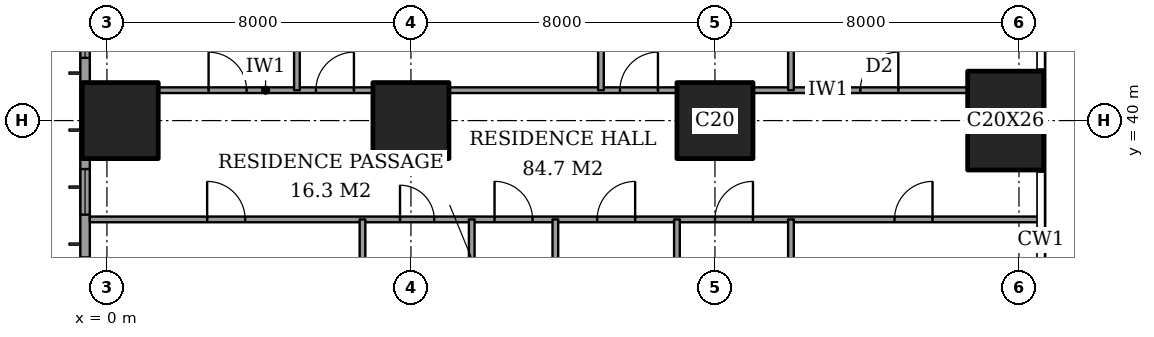
"""IFC4 building model, lengths in metres.
Left out: names, types, materials, properties, quantities, classifications, styles, units other than length and angle.
Written with IfcOpenShell. Run it as: python <this file> out.ifc"""

import sys

from ifc_helpers import new_model, si_unit, direction, frame, frame_2d, origin, origin_2d, place, context, subcontext, project, spatial, rectangle, extrude, element, fill, save


model = new_model("IFC4")
c1 = context("Model", 3, precision=1e-05, world=origin(), true_north=direction((0.0, 1.0)))
c2 = subcontext(c1, "Body", "Model", "MODEL_VIEW")
j1 = project(units=[si_unit("LENGTHUNIT", "METRE"), si_unit("PLANEANGLEUNIT", "RADIAN")], contexts=[c1])
p1 = place(None, origin())
s1 = spatial("IfcSite", under=j1, at=p1, CompositionType="ELEMENT")
p2 = place(p1, origin())
s2 = spatial("IfcBuilding", under=s1, at=p2, CompositionType="ELEMENT")
p3 = place(p2, frame((0.0, 0.0, 51.2)))
s3 = spatial("IfcBuildingStorey", under=s2, at=p3, CompositionType="ELEMENT", Elevation=51.2)
for number, where, z_axis, x_axis in (
    (1, (0.35, 40.0, 0.0), (0.0, 0.0, 1.0), (1.0, 0.0, 0.0)),
    (2, (8.0, 40.0, 0.0), (0.0, 0.0, 1.0), (1.0, 0.0, 0.0)),
    (3, (16.0, 40.0, 0.0), (0.0, 0.0, 1.0), (1.0, 0.0, 0.0)),
):
    element("IfcColumn", number, at=place(p3, frame(where, z_axis=z_axis, x_axis=x_axis)), inside=s3, PredefinedType="COLUMN", context=c2, shape_type="SweptSolid", body=[
        extrude(rectangle(XDim=2.0, YDim=2.0, at=origin_2d()), origin(), (0.0, 0.0, 1.0), 3.6),
    ])
p4 = place(p3, frame((23.65, 40.0, 0.0), z_axis=(0.0, 0.0, 1.0), x_axis=(1.0, 0.0, 0.0)))
e4 = element("IfcColumn", 4, at=p4, inside=s3, PredefinedType="COLUMN", context=c2, shape_type="SweptSolid", body=[
    extrude(rectangle(XDim=2.0, YDim=2.6, at=origin_2d()), origin(), (0.0, 0.0, 1.0), 3.6),
])
p5 = place(p3, frame((-0.575, 44.825, 0.0), z_axis=(0.0, 0.0, 1.0), x_axis=(0.0, -1.0, 0.0)))
e5 = element("IfcWall", 5, at=p5, inside=s3, PredefinedType="SOLIDWALL", context=c2, shape_type="SweptSolid", body=[
    extrude(rectangle(XDim=41.65, YDim=0.25, at=frame_2d((20.825, 0.0))), origin(), (0.0, 0.0, 1.0), 3.6),
])
p6 = place(p5, frame((0.775, 0.0, 0.6)))
e6 = element("IfcOpeningElement", 6, at=p6, cuts=e5, PredefinedType="OPENING", context=c2, shape_type="SweptSolid", body=[
    extrude(rectangle(XDim=2.4, YDim=2.0, at=frame_2d((1.2, 1.0))), frame((0.0, 0.135, 0.0), z_axis=(0.0, -1.0, 0.0), x_axis=(1.0, 0.0, 0.0)), (0.0, 0.0, 1.0), 0.27),
])
p7 = place(p5, frame((6.1, 0.0, 0.6)))
e7 = element("IfcOpeningElement", 7, at=p7, cuts=e5, PredefinedType="OPENING", context=c2, shape_type="SweptSolid", body=[
    extrude(rectangle(XDim=1.2, YDim=2.0, at=frame_2d((0.6, 1.0))), frame((0.0, 0.135, 0.0), z_axis=(0.0, -1.0, 0.0), x_axis=(1.0, 0.0, 0.0)), (0.0, 0.0, 1.0), 0.27),
])
p8 = place(p5, frame((8.425, 0.0, 0.6)))
e8 = element("IfcOpeningElement", 8, at=p8, cuts=e5, PredefinedType="OPENING", context=c2, shape_type="SweptSolid", body=[
    extrude(rectangle(XDim=2.4, YDim=2.0, at=frame_2d((1.2, 1.0))), frame((0.0, 0.135, 0.0), z_axis=(0.0, -1.0, 0.0), x_axis=(1.0, 0.0, 0.0)), (0.0, 0.0, 1.0), 0.27),
])
p9 = place(p5, frame((15.625, 0.0, 0.6)))
e9 = element("IfcOpeningElement", 9, at=p9, cuts=e5, PredefinedType="OPENING", context=c2, shape_type="SweptSolid", body=[
    extrude(rectangle(XDim=2.4, YDim=2.0, at=frame_2d((1.2, 1.0))), frame((0.0, 0.135, 0.0), z_axis=(0.0, -1.0, 0.0), x_axis=(1.0, 0.0, 0.0)), (0.0, 0.0, 1.0), 0.27),
])
p10 = place(p5, frame((23.625, 0.0, 0.6)))
e10 = element("IfcOpeningElement", 10, at=p10, cuts=e5, PredefinedType="OPENING", context=c2, shape_type="SweptSolid", body=[
    extrude(rectangle(XDim=2.4, YDim=2.0, at=frame_2d((1.2, 1.0))), frame((0.0, 0.135, 0.0), z_axis=(0.0, -1.0, 0.0), x_axis=(1.0, 0.0, 0.0)), (0.0, 0.0, 1.0), 0.27),
])
p11 = place(p5, frame((30.825, 0.0, 0.6)))
e11 = element("IfcOpeningElement", 11, at=p11, cuts=e5, PredefinedType="OPENING", context=c2, shape_type="SweptSolid", body=[
    extrude(rectangle(XDim=2.4, YDim=2.0, at=frame_2d((1.2, 1.0))), frame((0.0, 0.135, 0.0), z_axis=(0.0, -1.0, 0.0), x_axis=(1.0, 0.0, 0.0)), (0.0, 0.0, 1.0), 0.27),
])
p12 = place(p5, frame((34.5, 0.0, 0.6)))
e12 = element("IfcOpeningElement", 12, at=p12, cuts=e5, PredefinedType="OPENING", context=c2, shape_type="SweptSolid", body=[
    extrude(rectangle(XDim=1.2, YDim=2.0, at=frame_2d((0.6, 1.0))), frame((0.0, 0.135, 0.0), z_axis=(0.0, -1.0, 0.0), x_axis=(1.0, 0.0, 0.0)), (0.0, 0.0, 1.0), 0.27),
])
p13 = place(p5, frame((38.475, 0.0, 0.6)))
e13 = element("IfcOpeningElement", 13, at=p13, cuts=e5, PredefinedType="OPENING", context=c2, shape_type="SweptSolid", body=[
    extrude(rectangle(XDim=2.4, YDim=2.0, at=frame_2d((1.2, 1.0))), frame((0.0, 0.135, 0.0), z_axis=(0.0, -1.0, 0.0), x_axis=(1.0, 0.0, 0.0)), (0.0, 0.0, 1.0), 0.27),
])
p14 = place(p3, frame((-0.45, 37.4, 0.0), z_axis=(0.0, 0.0, 1.0), x_axis=(1.0, 0.0, 0.0)))
e14 = element("IfcWall", 14, at=p14, inside=s3, PredefinedType="PARTITIONING", context=c2, shape_type="SweptSolid", body=[
    extrude(rectangle(XDim=25.011, YDim=0.15, at=frame_2d((12.505, 0.0))), origin(), (0.0, 0.0, 1.0), 3.35),
])
p15 = place(p14, frame((10.65, 0.0, 0.0)))
e15 = element("IfcOpeningElement", 15, at=p15, cuts=e14, PredefinedType="OPENING", context=c2, shape_type="SweptSolid", body=[
    extrude(rectangle(XDim=1.0, YDim=2.1, at=frame_2d((0.5, 1.05))), frame((0.0, 0.085, 0.0), z_axis=(0.0, -1.0, 0.0), x_axis=(1.0, 0.0, 0.0)), (0.0, 0.0, 1.0), 0.17),
])
p16 = place(p14, frame((3.087, 0.0, 0.0)))
e16 = element("IfcOpeningElement", 16, at=p16, cuts=e14, PredefinedType="OPENING", context=c2, shape_type="SweptSolid", body=[
    extrude(rectangle(XDim=1.0, YDim=2.1, at=frame_2d((0.5, 1.05))), frame((0.0, 0.085, 0.0), z_axis=(0.0, -1.0, 0.0), x_axis=(1.0, 0.0, 0.0)), (0.0, 0.0, 1.0), 0.17),
])
p17 = place(p14, frame((8.163, 0.0, 0.0)))
e17 = element("IfcOpeningElement", 17, at=p17, cuts=e14, PredefinedType="OPENING", context=c2, shape_type="SweptSolid", body=[
    extrude(rectangle(XDim=0.9, YDim=2.1, at=frame_2d((0.45, 1.05))), frame((0.0, 0.085, 0.0), z_axis=(0.0, -1.0, 0.0), x_axis=(1.0, 0.0, 0.0)), (0.0, 0.0, 1.0), 0.17),
])
p18 = place(p14, frame((13.35, 0.0, 0.0)))
e18 = element("IfcOpeningElement", 18, at=p18, cuts=e14, PredefinedType="OPENING", context=c2, shape_type="SweptSolid", body=[
    extrude(rectangle(XDim=1.0, YDim=2.1, at=frame_2d((0.5, 1.05))), frame((0.0, 0.085, 0.0), z_axis=(0.0, -1.0, 0.0), x_axis=(1.0, 0.0, 0.0)), (0.0, 0.0, 1.0), 0.17),
])
p19 = place(p14, frame((16.45, 0.0, 0.0)))
e19 = element("IfcOpeningElement", 19, at=p19, cuts=e14, PredefinedType="OPENING", context=c2, shape_type="SweptSolid", body=[
    extrude(rectangle(XDim=1.0, YDim=2.1, at=frame_2d((0.5, 1.05))), frame((0.0, 0.085, 0.0), z_axis=(0.0, -1.0, 0.0), x_axis=(1.0, 0.0, 0.0)), (0.0, 0.0, 1.0), 0.17),
])
p20 = place(p14, frame((21.175, 0.0, 0.0)))
e20 = element("IfcOpeningElement", 20, at=p20, cuts=e14, PredefinedType="OPENING", context=c2, shape_type="SweptSolid", body=[
    extrude(rectangle(XDim=1.0, YDim=2.1, at=frame_2d((0.5, 1.05))), frame((0.0, 0.085, 0.0), z_axis=(0.0, -1.0, 0.0), x_axis=(1.0, 0.0, 0.0)), (0.0, 0.0, 1.0), 0.17),
])
p21 = place(p3, frame((1.35, 40.8, 0.0), z_axis=(0.0, 0.0, 1.0), x_axis=(1.0, 0.0, 0.0)))
e21 = element("IfcWall", 21, at=p21, inside=s3, PredefinedType="PARTITIONING", context=c2, shape_type="SweptSolid", body=[
    extrude(rectangle(XDim=5.65, YDim=0.15, at=frame_2d((2.825, 0.0))), origin(), (0.0, 0.0, 1.0), 3.35),
])
p22 = place(p21, frame((1.325, 0.0, 0.0)))
e22 = element("IfcOpeningElement", 22, at=p22, cuts=e21, PredefinedType="OPENING", context=c2, shape_type="SweptSolid", body=[
    extrude(rectangle(XDim=1.0, YDim=2.1, at=frame_2d((0.5, 1.05))), frame((0.0, 0.085, 0.0), z_axis=(0.0, -1.0, 0.0), x_axis=(1.0, 0.0, 0.0)), (0.0, 0.0, 1.0), 0.17),
])
p23 = place(p21, frame((4.15, 0.0, 0.0)))
e23 = element("IfcOpeningElement", 23, at=p23, cuts=e21, PredefinedType="OPENING", context=c2, shape_type="SweptSolid", body=[
    extrude(rectangle(XDim=1.0, YDim=2.1, at=frame_2d((0.5, 1.05))), frame((0.0, 0.085, 0.0), z_axis=(0.0, -1.0, 0.0), x_axis=(1.0, 0.0, 0.0)), (0.0, 0.0, 1.0), 0.17),
])
p24 = place(p3, frame((9.0, 40.8, 0.0), z_axis=(0.0, 0.0, 1.0), x_axis=(1.0, 0.0, 0.0)))
e24 = element("IfcWall", 24, at=p24, inside=s3, PredefinedType="PARTITIONING", context=c2, shape_type="SweptSolid", body=[
    extrude(rectangle(XDim=6.0, YDim=0.15, at=frame_2d((3.0, 0.0))), origin(), (0.0, 0.0, 1.0), 3.35),
])
p25 = place(p24, frame((4.5, 0.0, 0.0)))
e25 = element("IfcOpeningElement", 25, at=p25, cuts=e24, PredefinedType="OPENING", context=c2, shape_type="SweptSolid", body=[
    extrude(rectangle(XDim=1.0, YDim=2.1, at=frame_2d((0.5, 1.05))), frame((0.0, 0.085, 0.0), z_axis=(0.0, -1.0, 0.0), x_axis=(1.0, 0.0, 0.0)), (0.0, 0.0, 1.0), 0.17),
])
p26 = place(p3, frame((17.0, 40.8, 0.0), z_axis=(0.0, 0.0, 1.0), x_axis=(1.0, 0.0, 0.0)))
e26 = element("IfcWall", 26, at=p26, inside=s3, PredefinedType="PARTITIONING", context=c2, shape_type="SweptSolid", body=[
    extrude(rectangle(XDim=5.65, YDim=0.15, at=frame_2d((2.825, 0.0))), origin(), (0.0, 0.0, 1.0), 3.35),
])
p27 = place(p26, frame((2.825, 0.0, 0.0)))
e27 = element("IfcOpeningElement", 27, at=p27, cuts=e26, PredefinedType="OPENING", context=c2, shape_type="SweptSolid", body=[
    extrude(rectangle(XDim=1.0, YDim=2.1, at=frame_2d((0.5, 1.05))), frame((0.0, 0.085, 0.0), z_axis=(0.0, -1.0, 0.0), x_axis=(1.0, 0.0, 0.0)), (0.0, 0.0, 1.0), 0.17),
])
p28 = place(p3, frame((5.0, 40.8, 0.0), z_axis=(0.0, 0.0, 1.0), x_axis=(0.0, 1.0, 0.0)))
e28 = element("IfcWall", 28, at=p28, inside=s3, PredefinedType="PARTITIONING", context=c2, shape_type="SweptSolid", body=[
    extrude(rectangle(XDim=7.65, YDim=0.15, at=frame_2d((3.825, 0.0))), origin(), (0.0, 0.0, 1.0), 3.35),
])
p29 = place(p3, frame((6.725, 33.2, 0.0), z_axis=(0.0, 0.0, 1.0), x_axis=(0.0, 1.0, 0.0)))
e29 = element("IfcWall", 29, at=p29, inside=s3, PredefinedType="PARTITIONING", context=c2, shape_type="SweptSolid", body=[
    extrude(rectangle(XDim=4.2, YDim=0.15, at=frame_2d((2.1, 0.0))), origin(), (0.0, 0.0, 1.0), 3.35),
])
p30 = place(p3, frame((9.6, 28.0, 0.0), z_axis=(0.0, 0.0, 1.0), x_axis=(0.0, 1.0, 0.0)))
e30 = element("IfcWall", 30, at=p30, inside=s3, PredefinedType="PARTITIONING", context=c2, shape_type="SweptSolid", body=[
    extrude(rectangle(XDim=9.4, YDim=0.15, at=frame_2d((4.7, 0.0))), origin(), (0.0, 0.0, 1.0), 3.35),
])
p31 = place(p30, frame((0.5, 0.0, 0.0)))
e31 = element("IfcOpeningElement", 31, at=p31, cuts=e30, PredefinedType="OPENING", context=c2, shape_type="SweptSolid", body=[
    extrude(rectangle(XDim=1.0, YDim=2.1, at=frame_2d((0.5, 1.05))), frame((0.0, 0.085, 0.0), z_axis=(0.0, -1.0, 0.0), x_axis=(1.0, 0.0, 0.0)), (0.0, 0.0, 1.0), 0.17),
])
p32 = place(p3, frame((11.8, 30.0, 0.0), z_axis=(0.0, 0.0, 1.0), x_axis=(0.0, 1.0, 0.0)))
e32 = element("IfcWall", 32, at=p32, inside=s3, PredefinedType="PARTITIONING", context=c2, shape_type="SweptSolid", body=[
    extrude(rectangle(XDim=7.4, YDim=0.15, at=frame_2d((3.7, 0.0))), origin(), (0.0, 0.0, 1.0), 3.35),
])
p33 = place(p3, frame((13.0, 40.8, 0.0), z_axis=(0.0, 0.0, 1.0), x_axis=(0.0, 1.0, 0.0)))
e33 = element("IfcWall", 33, at=p33, inside=s3, PredefinedType="PARTITIONING", context=c2, shape_type="SweptSolid", body=[
    extrude(rectangle(XDim=7.65, YDim=0.15, at=frame_2d((3.825, 0.0))), origin(), (0.0, 0.0, 1.0), 3.35),
])
p34 = place(p3, frame((15.0, 33.2, 0.0), z_axis=(0.0, 0.0, 1.0), x_axis=(0.0, 1.0, 0.0)))
e34 = element("IfcWall", 34, at=p34, inside=s3, PredefinedType="PARTITIONING", context=c2, shape_type="SweptSolid", body=[
    extrude(rectangle(XDim=4.2, YDim=0.15, at=frame_2d((2.1, 0.0))), origin(), (0.0, 0.0, 1.0), 3.35),
])
p35 = place(p3, frame((18.0, 31.1, 0.0), z_axis=(0.0, 0.0, 1.0), x_axis=(0.0, 1.0, 0.0)))
e35 = element("IfcWall", 35, at=p35, inside=s3, PredefinedType="PARTITIONING", context=c2, shape_type="SweptSolid", body=[
    extrude(rectangle(XDim=6.3, YDim=0.15, at=frame_2d((3.15, 0.0))), origin(), (0.0, 0.0, 1.0), 3.35),
])
p36 = place(p3, frame((18.0, 40.8, 0.0), z_axis=(0.0, 0.0, 1.0), x_axis=(0.0, 1.0, 0.0)))
e36 = element("IfcWall", 36, at=p36, inside=s3, PredefinedType="PARTITIONING", context=c2, shape_type="SweptSolid", body=[
    extrude(rectangle(XDim=7.65, YDim=0.15, at=frame_2d((3.825, 0.0))), origin(), (0.0, 0.0, 1.0), 3.35),
])
p37 = place(p6, origin())
e37 = element("IfcWindow", 37, at=p37, inside=s3, PartitioningType="SINGLE_PANEL", PredefinedType="WINDOW", context=c2, shape_type="SweptSolid", body=[
    extrude(rectangle(XDim=2.4, YDim=2.0, at=frame_2d((1.2, 1.0))), frame((0.0, 0.03, 0.0), z_axis=(0.0, -1.0, 0.0), x_axis=(1.0, 0.0, 0.0)), (0.0, 0.0, 1.0), 0.06),
])
fill(e6, e37)
p38 = place(p7, origin())
e38 = element("IfcWindow", 38, at=p38, inside=s3, PartitioningType="SINGLE_PANEL", PredefinedType="WINDOW", context=c2, shape_type="SweptSolid", body=[
    extrude(rectangle(XDim=1.2, YDim=2.0, at=frame_2d((0.6, 1.0))), frame((0.0, 0.03, 0.0), z_axis=(0.0, -1.0, 0.0), x_axis=(1.0, 0.0, 0.0)), (0.0, 0.0, 1.0), 0.06),
])
fill(e7, e38)
p39 = place(p22, origin())
e39 = element("IfcDoor", 39, at=p39, inside=s3, OperationType="SINGLE_SWING_RIGHT", PredefinedType="DOOR", context=c2, shape_type="SweptSolid", body=[
    extrude(rectangle(XDim=1.0, YDim=2.1, at=frame_2d((0.5, 1.05))), frame((0.0, 0.025, 0.0), z_axis=(0.0, -1.0, 0.0), x_axis=(1.0, 0.0, 0.0)), (0.0, 0.0, 1.0), 0.05),
])
fill(e22, e39)
p40 = place(p23, origin())
e40 = element("IfcDoor", 40, at=p40, inside=s3, OperationType="SINGLE_SWING_LEFT", PredefinedType="DOOR", context=c2, shape_type="SweptSolid", body=[
    extrude(rectangle(XDim=1.0, YDim=2.1, at=frame_2d((0.5, 1.05))), frame((0.0, 0.025, 0.0), z_axis=(0.0, -1.0, 0.0), x_axis=(1.0, 0.0, 0.0)), (0.0, 0.0, 1.0), 0.05),
])
fill(e23, e40)
p41 = place(p25, origin())
e41 = element("IfcDoor", 41, at=p41, inside=s3, OperationType="SINGLE_SWING_LEFT", PredefinedType="DOOR", context=c2, shape_type="SweptSolid", body=[
    extrude(rectangle(XDim=1.0, YDim=2.1, at=frame_2d((0.5, 1.05))), frame((0.0, 0.025, 0.0), z_axis=(0.0, -1.0, 0.0), x_axis=(1.0, 0.0, 0.0)), (0.0, 0.0, 1.0), 0.05),
])
fill(e25, e41)
p42 = place(p27, origin())
e42 = element("IfcDoor", 42, at=p42, inside=s3, OperationType="SINGLE_SWING_LEFT", PredefinedType="DOOR", context=c2, shape_type="SweptSolid", body=[
    extrude(rectangle(XDim=1.0, YDim=2.1, at=frame_2d((0.5, 1.05))), frame((0.0, 0.025, 0.0), z_axis=(0.0, -1.0, 0.0), x_axis=(1.0, 0.0, 0.0)), (0.0, 0.0, 1.0), 0.05),
])
fill(e27, e42)
p43 = place(p15, origin())
e43 = element("IfcDoor", 43, at=p43, inside=s3, OperationType="SINGLE_SWING_RIGHT", PredefinedType="DOOR", context=c2, shape_type="SweptSolid", body=[
    extrude(rectangle(XDim=1.0, YDim=2.1, at=frame_2d((0.5, 1.05))), frame((0.0, 0.025, 0.0), z_axis=(0.0, -1.0, 0.0), x_axis=(1.0, 0.0, 0.0)), (0.0, 0.0, 1.0), 0.05),
])
fill(e15, e43)
p44 = place(p16, origin())
e44 = element("IfcDoor", 44, at=p44, inside=s3, OperationType="SINGLE_SWING_RIGHT", PredefinedType="DOOR", context=c2, shape_type="SweptSolid", body=[
    extrude(rectangle(XDim=1.0, YDim=2.1, at=frame_2d((0.5, 1.05))), frame((0.0, 0.025, 0.0), z_axis=(0.0, -1.0, 0.0), x_axis=(1.0, 0.0, 0.0)), (0.0, 0.0, 1.0), 0.05),
])
fill(e16, e44)
p45 = place(p17, origin())
e45 = element("IfcDoor", 45, at=p45, inside=s3, OperationType="SINGLE_SWING_RIGHT", PredefinedType="DOOR", context=c2, shape_type="SweptSolid", body=[
    extrude(rectangle(XDim=0.9, YDim=2.1, at=frame_2d((0.45, 1.05))), frame((0.0, 0.025, 0.0), z_axis=(0.0, -1.0, 0.0), x_axis=(1.0, 0.0, 0.0)), (0.0, 0.0, 1.0), 0.05),
])
fill(e17, e45)
p46 = place(p18, origin())
e46 = element("IfcDoor", 46, at=p46, inside=s3, OperationType="SINGLE_SWING_LEFT", PredefinedType="DOOR", context=c2, shape_type="SweptSolid", body=[
    extrude(rectangle(XDim=1.0, YDim=2.1, at=frame_2d((0.5, 1.05))), frame((0.0, 0.025, 0.0), z_axis=(0.0, -1.0, 0.0), x_axis=(1.0, 0.0, 0.0)), (0.0, 0.0, 1.0), 0.05),
])
fill(e18, e46)
p47 = place(p19, origin())
e47 = element("IfcDoor", 47, at=p47, inside=s3, OperationType="SINGLE_SWING_LEFT", PredefinedType="DOOR", context=c2, shape_type="SweptSolid", body=[
    extrude(rectangle(XDim=1.0, YDim=2.1, at=frame_2d((0.5, 1.05))), frame((0.0, 0.025, 0.0), z_axis=(0.0, -1.0, 0.0), x_axis=(1.0, 0.0, 0.0)), (0.0, 0.0, 1.0), 0.05),
])
fill(e19, e47)
p48 = place(p20, origin())
e48 = element("IfcDoor", 48, at=p48, inside=s3, OperationType="SINGLE_SWING_LEFT", PredefinedType="DOOR", context=c2, shape_type="SweptSolid", body=[
    extrude(rectangle(XDim=1.0, YDim=2.1, at=frame_2d((0.5, 1.05))), frame((0.0, 0.025, 0.0), z_axis=(0.0, -1.0, 0.0), x_axis=(1.0, 0.0, 0.0)), (0.0, 0.0, 1.0), 0.05),
])
fill(e20, e48)
save(model, sys.argv[1])
